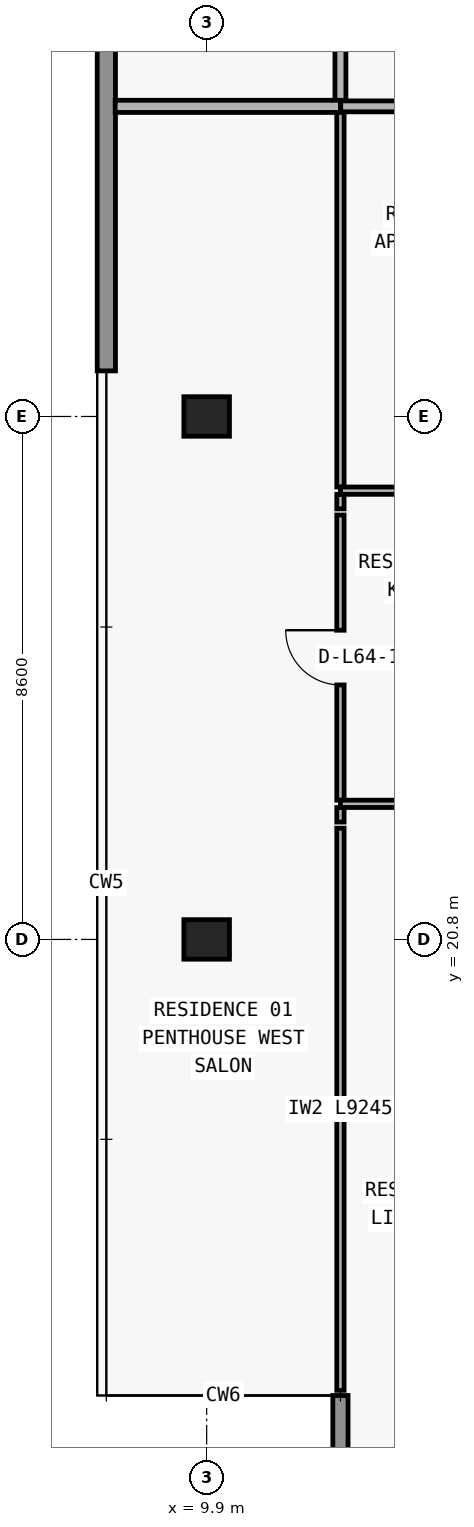
"""IFC4 building model, lengths in metres.
Left out: names, types, materials, properties, quantities, classifications, styles, units other than length and angle.
Written with IfcOpenShell. Run it as: python <this file> out.ifc"""

import sys

from ifc_helpers import new_model, si_unit, direction, frame, frame_2d, origin, origin_2d, place, context, subcontext, project, spatial, rectangle, extrude, element, fill, save


model = new_model("IFC4")
c1 = context("Model", 3, precision=1e-05, world=origin(), true_north=direction((0.0, 1.0)))
c2 = subcontext(c1, "Body", "Model", "MODEL_VIEW")
j1 = project(units=[si_unit("LENGTHUNIT", "METRE"), si_unit("PLANEANGLEUNIT", "RADIAN")], contexts=[c1])
p1 = place(None, origin())
s1 = spatial("IfcSite", under=j1, at=p1, CompositionType="ELEMENT")
p2 = place(p1, origin())
s2 = spatial("IfcBuilding", under=s1, at=p2, CompositionType="ELEMENT")
p3 = place(p2, frame((0.0, 0.0, 229.8)))
s3 = spatial("IfcBuildingStorey", under=s2, at=p3, CompositionType="ELEMENT", Elevation=229.8)
for number, where, z_axis, x_axis in (
    (1, (9.9, 20.8, 0.0), (0.0, 0.0, 1.0), (1.0, 0.0, 0.0)),
    (2, (9.9, 29.4, 0.0), (0.0, 0.0, 1.0), (1.0, 0.0, 0.0)),
):
    element("IfcColumn", number, at=place(p3, frame(where, z_axis=z_axis, x_axis=x_axis)), inside=s3, PredefinedType="COLUMN", context=c2, shape_type="SweptSolid", body=[
        extrude(rectangle(XDim=0.75, YDim=0.65, at=origin_2d()), origin(), (0.0, 0.0, 1.0), 3.05),
    ])
p4 = place(p3, frame((12.1, 13.3, 0.0), z_axis=(0.0, 0.0, 1.0), x_axis=(0.0, -1.0, 0.0)))
e3 = element("IfcWall", 3, at=p4, inside=s3, PredefinedType="ELEMENTEDWALL", context=c2, shape_type="SweptSolid", body=[
    extrude(rectangle(XDim=3.45, YDim=0.25, at=frame_2d((1.725, 0.0))), origin(), (0.0, 0.0, 1.0), 3.05),
])
p5 = place(p3, frame((8.25, 30.15, 0.0), z_axis=(0.0, 0.0, 1.0), x_axis=(0.0, 1.0, 0.0)))
e4 = element("IfcWall", 4, at=p5, inside=s3, PredefinedType="STANDARD", context=c2, shape_type="SweptSolid", body=[
    extrude(rectangle(XDim=16.85, YDim=0.3, at=frame_2d((8.425, 0.0))), origin(), (0.0, 0.0, 1.0), 3.05),
])
p6 = place(p3, frame((12.1, 13.385, 0.0), z_axis=(0.0, 0.0, 1.0), x_axis=(0.0, 1.0, 0.0)))
e5 = element("IfcWall", 5, at=p6, inside=s3, PredefinedType="PARTITIONING", context=c2, shape_type="SweptSolid", body=[
    extrude(rectangle(XDim=9.245, YDim=0.12, at=frame_2d((4.623, 0.0))), origin(), (0.0, 0.0, 1.0), 3.05),
])
p7 = place(p3, frame((12.1, 22.73, 0.0), z_axis=(0.0, 0.0, 1.0), x_axis=(0.0, 1.0, 0.0)))
e6 = element("IfcWall", 6, at=p7, inside=s3, PredefinedType="PARTITIONING", context=c2, shape_type="SweptSolid", body=[
    extrude(rectangle(XDim=0.24, YDim=0.12, at=frame_2d((0.12, 0.0))), origin(), (0.0, 0.0, 1.0), 3.05),
])
p8 = place(p3, frame((12.1, 23.09, 0.0), z_axis=(0.0, 0.0, 1.0), x_axis=(0.0, 1.0, 0.0)))
e7 = element("IfcWall", 7, at=p8, inside=s3, PredefinedType="PARTITIONING", context=c2, shape_type="SweptSolid", body=[
    extrude(rectangle(XDim=4.69, YDim=0.12, at=frame_2d((2.345, 0.0))), origin(), (0.0, 0.0, 1.0), 3.05),
])
p9 = place(p8, frame((1.895, 0.0, 0.0)))
e8 = element("IfcOpeningElement", 8, at=p9, cuts=e7, PredefinedType="OPENING", context=c2, shape_type="SweptSolid", body=[
    extrude(rectangle(XDim=0.9, YDim=2.15, at=frame_2d((0.45, 1.075))), frame((0.0, 0.07, 0.0), z_axis=(0.0, -1.0, 0.0), x_axis=(1.0, 0.0, 0.0)), (0.0, 0.0, 1.0), 0.14),
])
p10 = place(p3, frame((12.1, 27.88, 0.0), z_axis=(0.0, 0.0, 1.0), x_axis=(0.0, 1.0, 0.0)))
e9 = element("IfcWall", 9, at=p10, inside=s3, PredefinedType="PARTITIONING", context=c2, shape_type="SweptSolid", body=[
    extrude(rectangle(XDim=0.24, YDim=0.12, at=frame_2d((0.12, 0.0))), origin(), (0.0, 0.0, 1.0), 3.05),
])
p11 = place(p3, frame((12.1, 28.24, 0.0), z_axis=(0.0, 0.0, 1.0), x_axis=(0.0, 1.0, 0.0)))
e10 = element("IfcWall", 10, at=p11, inside=s3, PredefinedType="PARTITIONING", context=c2, shape_type="SweptSolid", body=[
    extrude(rectangle(XDim=6.26, YDim=0.12, at=frame_2d((3.13, 0.0))), origin(), (0.0, 0.0, 1.0), 3.05),
])
p12 = place(p3, frame((12.1, 34.505, 0.0), z_axis=(0.0, 0.0, 1.0), x_axis=(0.0, 1.0, 0.0)))
e11 = element("IfcWall", 11, at=p12, inside=s3, PredefinedType="PARTITIONING", context=c2, shape_type="SweptSolid", body=[
    extrude(rectangle(XDim=2.495, YDim=0.18, at=frame_2d((1.248, 0.0))), origin(), (0.0, 0.0, 1.0), 3.05),
])
p13 = place(p3, frame((12.1, 23.03, 0.0), z_axis=(0.0, 0.0, 1.0), x_axis=(1.0, 0.0, 0.0)))
e12 = element("IfcWall", 12, at=p13, inside=s3, PredefinedType="PARTITIONING", context=c2, shape_type="SweptSolid", body=[
    extrude(rectangle(XDim=6.2, YDim=0.12, at=frame_2d((3.1, 0.0))), origin(), (0.0, 0.0, 1.0), 3.05),
])
p14 = place(p13, frame((1.1, 0.0, 0.0)))
e13 = element("IfcOpeningElement", 13, at=p14, cuts=e12, PredefinedType="OPENING", context=c2, shape_type="SweptSolid", body=[
    extrude(rectangle(XDim=0.9, YDim=2.15, at=frame_2d((0.45, 1.075))), frame((0.0, 0.07, 0.0), z_axis=(0.0, -1.0, 0.0), x_axis=(1.0, 0.0, 0.0)), (0.0, 0.0, 1.0), 0.14),
])
p15 = place(p13, frame((4.324, 0.0, 0.0)))
e14 = element("IfcOpeningElement", 14, at=p15, cuts=e12, PredefinedType="OPENING", context=c2, shape_type="SweptSolid", body=[
    extrude(rectangle(XDim=0.9, YDim=2.15, at=frame_2d((0.45, 1.075))), frame((0.0, 0.07, 0.0), z_axis=(0.0, -1.0, 0.0), x_axis=(1.0, 0.0, 0.0)), (0.0, 0.0, 1.0), 0.14),
])
p16 = place(p3, frame((12.1, 28.18, 0.0), z_axis=(0.0, 0.0, 1.0), x_axis=(1.0, 0.0, 0.0)))
e15 = element("IfcWall", 15, at=p16, inside=s3, PredefinedType="PARTITIONING", context=c2, shape_type="SweptSolid", body=[
    extrude(rectangle(XDim=6.2, YDim=0.12, at=frame_2d((3.1, 0.0))), origin(), (0.0, 0.0, 1.0), 3.05),
])
p17 = place(p16, frame((1.224, 0.0, 0.0)))
e16 = element("IfcOpeningElement", 16, at=p17, cuts=e15, PredefinedType="OPENING", context=c2, shape_type="SweptSolid", body=[
    extrude(rectangle(XDim=0.9, YDim=2.15, at=frame_2d((0.45, 1.075))), frame((0.0, 0.07, 0.0), z_axis=(0.0, -1.0, 0.0), x_axis=(1.0, 0.0, 0.0)), (0.0, 0.0, 1.0), 0.14),
])
p18 = place(p3, frame((8.395, 34.5, 0.0), z_axis=(0.0, 0.0, 1.0), x_axis=(1.0, 0.0, 0.0)))
e17 = element("IfcWall", 17, at=p18, inside=s3, PredefinedType="PARTITIONING", context=c2, shape_type="SweptSolid", body=[
    extrude(rectangle(XDim=3.705, YDim=0.2, at=frame_2d((1.853, 0.0))), origin(), (0.0, 0.0, 1.0), 3.05),
])
p19 = place(p3, frame((12.105, 34.5, 0.0), z_axis=(0.0, 0.0, 1.0), x_axis=(1.0, 0.0, 0.0)))
e18 = element("IfcWall", 18, at=p19, inside=s3, PredefinedType="PARTITIONING", context=c2, shape_type="SweptSolid", body=[
    extrude(rectangle(XDim=14.545, YDim=0.18, at=frame_2d((7.272, 0.0))), origin(), (0.0, 0.0, 1.0), 3.05),
])
p20 = place(p19, frame((1.772, 0.0, 0.0)))
e19 = element("IfcOpeningElement", 19, at=p20, cuts=e18, PredefinedType="OPENING", context=c2, shape_type="SweptSolid", body=[
    extrude(rectangle(XDim=1.0, YDim=2.2, at=frame_2d((0.5, 1.1))), frame((0.0, 0.1, 0.0), z_axis=(0.0, -1.0, 0.0), x_axis=(1.0, 0.0, 0.0)), (0.0, 0.0, 1.0), 0.2),
])
p21 = place(p19, frame((9.07, 0.0, 0.0)))
e20 = element("IfcOpeningElement", 20, at=p21, cuts=e18, PredefinedType="OPENING", context=c2, shape_type="SweptSolid", body=[
    extrude(rectangle(XDim=1.0, YDim=2.2, at=frame_2d((0.5, 1.1))), frame((0.0, 0.1, 0.0), z_axis=(0.0, -1.0, 0.0), x_axis=(1.0, 0.0, 0.0)), (0.0, 0.0, 1.0), 0.2),
])
p22 = place(p9, origin())
e21 = element("IfcDoor", 21, at=p22, inside=s3, OperationType="SINGLE_SWING_RIGHT", PredefinedType="DOOR", context=c2, shape_type="SweptSolid", body=[
    extrude(rectangle(XDim=0.9, YDim=2.15, at=frame_2d((0.45, 1.075))), frame((0.0, 0.025, 0.0), z_axis=(0.0, -1.0, 0.0), x_axis=(1.0, 0.0, 0.0)), (0.0, 0.0, 1.0), 0.05),
])
fill(e8, e21)
save(model, sys.argv[1])
